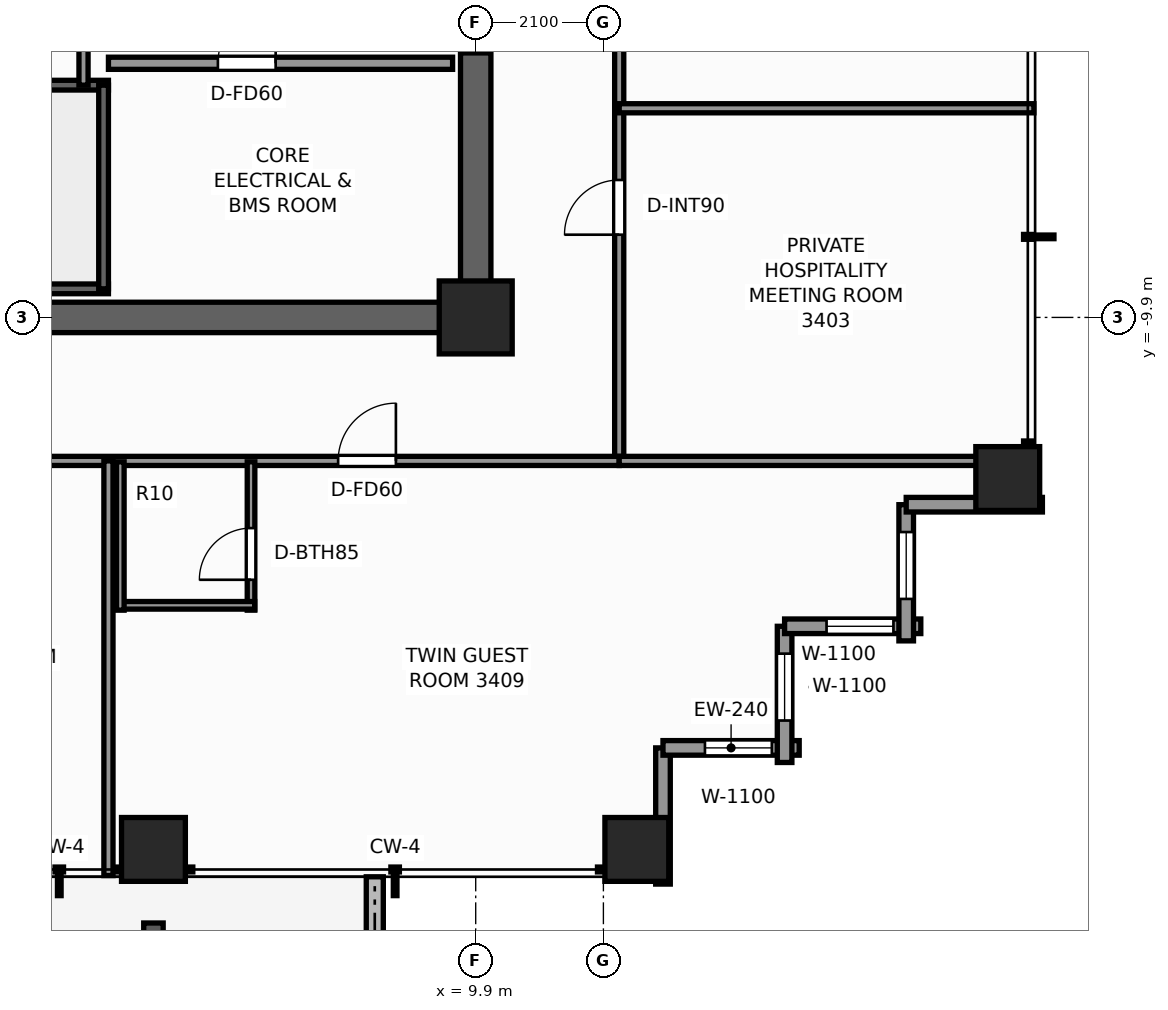
"""IFC4 building model, lengths in metres.
Left out: names, types, materials, properties, quantities, classifications, styles, units other than length and angle.
Written with IfcOpenShell. Run it as: python <this file> out.ifc"""

import sys

from ifc_helpers import new_model, si_unit, direction, frame, frame_2d, origin, origin_2d, place, context, subcontext, project, spatial, rectangle, extrude, element, fill, save


model = new_model("IFC4")
c1 = context("Model", 3, precision=1e-05, world=origin(), true_north=direction((0.0, 1.0)))
c2 = subcontext(c1, "Body", "Model", "MODEL_VIEW")
j1 = project(units=[si_unit("LENGTHUNIT", "METRE"), si_unit("PLANEANGLEUNIT", "RADIAN")], contexts=[c1])
p1 = place(None, origin())
s1 = spatial("IfcSite", under=j1, at=p1, CompositionType="ELEMENT")
p2 = place(p1, origin())
s2 = spatial("IfcBuilding", under=s1, at=p2, CompositionType="ELEMENT")
p3 = place(p2, frame((0.0, 0.0, 118.4)))
s3 = spatial("IfcBuildingStorey", under=s2, at=p3, CompositionType="ELEMENT", Elevation=118.4)
p4 = place(p3, frame((10.15, -9.9, 0.0), z_axis=(0.0, 0.0, 1.0), x_axis=(-1.0, 0.0, 0.0)))
e1 = element("IfcWall", 1, at=p4, inside=s3, PredefinedType="SHEAR", context=c2, shape_type="SweptSolid", body=[
    extrude(rectangle(XDim=12.01, YDim=0.5, at=frame_2d((6.005, 0.0))), origin(), (0.0, 0.0, 1.0), 3.3),
])
p5 = place(p3, frame((9.9, -9.65, 0.0), z_axis=(0.0, 0.0, 1.0), x_axis=(0.0, 1.0, 0.0)))
e2 = element("IfcWall", 2, at=p5, inside=s3, PredefinedType="SHEAR", context=c2, shape_type="SweptSolid", body=[
    extrude(rectangle(XDim=4.1, YDim=0.5, at=frame_2d((2.05, 0.0))), origin(), (0.0, 0.0, 1.0), 3.3),
])
p6 = place(p3, frame((9.9, -9.9, 0.0), z_axis=(0.0, 0.0, 1.0), x_axis=(1.0, 0.0, 0.0)))
e3 = element("IfcColumn", 3, at=p6, inside=s3, PredefinedType="COLUMN", context=c2, shape_type="SweptSolid", body=[
    extrude(rectangle(XDim=1.2, YDim=1.2, at=origin_2d()), origin(), (0.0, 0.0, 1.0), 3.3),
])
for number, where, z_axis, x_axis in (
    (4, (4.6, -18.65, 0.0), (0.0, 0.0, 1.0), (1.0, 0.0, 0.0)),
    (5, (12.55, -18.65, 0.0), (0.0, 0.0, 1.0), (1.0, 0.0, 0.0)),
    (6, (18.65, -12.55, 0.0), (0.0, 0.0, 1.0), (1.0, 0.0, 0.0)),
):
    element("IfcColumn", number, at=place(p3, frame(where, z_axis=z_axis, x_axis=x_axis)), inside=s3, PredefinedType="COLUMN", context=c2, shape_type="SweptSolid", body=[
        extrude(rectangle(XDim=1.05, YDim=1.05, at=origin_2d()), origin(), (0.0, 0.0, 1.0), 3.3),
    ])
p7 = place(p3, frame((8.24, -20.566, -0.04), z_axis=(0.0, 0.0, 1.0), x_axis=(0.0, 1.0, 0.0)))
e7 = element("IfcWall", 7, at=p7, inside=s3, PredefinedType="PARAPET", context=c2, shape_type="SweptSolid", body=[
    extrude(rectangle(XDim=1.466, YDim=0.28, at=frame_2d((0.733, 0.0))), origin(), (0.0, 0.0, 1.0), 0.42),
])
p8 = place(p3, frame((12.98, -16.98, 0.0), z_axis=(0.0, 0.0, 1.0), x_axis=(0.0, -1.0, 0.0)))
e8 = element("IfcWall", 8, at=p8, inside=s3, PredefinedType="STANDARD", context=c2, shape_type="SweptSolid", body=[
    extrude(rectangle(XDim=2.24, YDim=0.24, at=frame_2d((1.12, 0.0))), origin(), (0.0, 0.0, 1.0), 2.459),
])
p9 = place(p3, frame((15.22, -16.98, 0.0), z_axis=(0.0, 0.0, 1.0), x_axis=(-1.0, 0.0, 0.0)))
e9 = element("IfcWall", 9, at=p9, inside=s3, PredefinedType="STANDARD", context=c2, shape_type="SweptSolid", body=[
    extrude(rectangle(XDim=2.24, YDim=0.24, at=frame_2d((1.12, 0.0))), origin(), (0.0, 0.0, 1.0), 2.459),
])
p10 = place(p9, frame((0.45, 0.0, 0.65)))
e10 = element("IfcOpeningElement", 10, at=p10, cuts=e9, PredefinedType="OPENING", context=c2, shape_type="SweptSolid", body=[
    extrude(rectangle(XDim=1.1, YDim=1.45, at=frame_2d((0.55, 0.725))), frame((0.0, 0.13, 0.0), z_axis=(0.0, -1.0, 0.0), x_axis=(1.0, 0.0, 0.0)), (0.0, 0.0, 1.0), 0.26),
])
p11 = place(p3, frame((14.98, -14.98, 0.0), z_axis=(0.0, 0.0, 1.0), x_axis=(0.0, -1.0, 0.0)))
e11 = element("IfcWall", 11, at=p11, inside=s3, PredefinedType="STANDARD", context=c2, shape_type="SweptSolid", body=[
    extrude(rectangle(XDim=2.24, YDim=0.24, at=frame_2d((1.12, 0.0))), origin(), (0.0, 0.0, 1.0), 2.459),
])
p12 = place(p11, frame((0.45, 0.0, 0.65)))
e12 = element("IfcOpeningElement", 12, at=p12, cuts=e11, PredefinedType="OPENING", context=c2, shape_type="SweptSolid", body=[
    extrude(rectangle(XDim=1.1, YDim=1.45, at=frame_2d((0.55, 0.725))), frame((0.0, 0.13, 0.0), z_axis=(0.0, -1.0, 0.0), x_axis=(1.0, 0.0, 0.0)), (0.0, 0.0, 1.0), 0.26),
])
p13 = place(p3, frame((17.22, -14.98, 0.0), z_axis=(0.0, 0.0, 1.0), x_axis=(-1.0, 0.0, 0.0)))
e13 = element("IfcWall", 13, at=p13, inside=s3, PredefinedType="STANDARD", context=c2, shape_type="SweptSolid", body=[
    extrude(rectangle(XDim=2.24, YDim=0.24, at=frame_2d((1.12, 0.0))), origin(), (0.0, 0.0, 1.0), 2.459),
])
p14 = place(p13, frame((0.45, 0.0, 0.65)))
e14 = element("IfcOpeningElement", 14, at=p14, cuts=e13, PredefinedType="OPENING", context=c2, shape_type="SweptSolid", body=[
    extrude(rectangle(XDim=1.1, YDim=1.45, at=frame_2d((0.55, 0.725))), frame((0.0, 0.13, 0.0), z_axis=(0.0, -1.0, 0.0), x_axis=(1.0, 0.0, 0.0)), (0.0, 0.0, 1.0), 0.26),
])
p15 = place(p3, frame((16.98, -12.98, 0.0), z_axis=(0.0, 0.0, 1.0), x_axis=(0.0, -1.0, 0.0)))
e15 = element("IfcWall", 15, at=p15, inside=s3, PredefinedType="STANDARD", context=c2, shape_type="SweptSolid", body=[
    extrude(rectangle(XDim=2.24, YDim=0.24, at=frame_2d((1.12, 0.0))), origin(), (0.0, 0.0, 1.0), 2.459),
])
p16 = place(p15, frame((0.45, 0.0, 0.65)))
e16 = element("IfcOpeningElement", 16, at=p16, cuts=e15, PredefinedType="OPENING", context=c2, shape_type="SweptSolid", body=[
    extrude(rectangle(XDim=1.1, YDim=1.45, at=frame_2d((0.55, 0.725))), frame((0.0, 0.13, 0.0), z_axis=(0.0, -1.0, 0.0), x_axis=(1.0, 0.0, 0.0)), (0.0, 0.0, 1.0), 0.26),
])
p17 = place(p3, frame((19.22, -12.98, 0.0), z_axis=(0.0, 0.0, 1.0), x_axis=(-1.0, 0.0, 0.0)))
e17 = element("IfcWall", 17, at=p17, inside=s3, PredefinedType="STANDARD", context=c2, shape_type="SweptSolid", body=[
    extrude(rectangle(XDim=2.24, YDim=0.24, at=frame_2d((1.12, 0.0))), origin(), (0.0, 0.0, 1.0), 2.459),
])
p18 = place(p3, frame((3.86, -9.43, 0.0), z_axis=(0.0, 0.0, 1.0), x_axis=(-1.0, 0.0, 0.0)))
e18 = element("IfcWall", 18, at=p18, inside=s3, PredefinedType="SHEAR", context=c2, shape_type="SweptSolid", body=[
    extrude(rectangle(XDim=7.72, YDim=0.16, at=frame_2d((3.86, 0.0))), origin(), (0.0, 0.0, 1.0), 3.3),
])
p19 = place(p18, frame((6.01, 0.0, 0.0)))
e19 = element("IfcOpeningElement", 19, at=p19, cuts=e18, PredefinedType="OPENING", context=c2, shape_type="SweptSolid", body=[
    extrude(rectangle(XDim=1.1, YDim=2.2, at=frame_2d((0.55, 1.1))), frame((0.0, 0.09, 0.0), z_axis=(0.0, -1.0, 0.0), x_axis=(1.0, 0.0, 0.0)), (0.0, 0.0, 1.0), 0.18),
])
p20 = place(p3, frame((-3.86, -6.08, 0.0), z_axis=(0.0, 0.0, 1.0), x_axis=(1.0, 0.0, 0.0)))
e20 = element("IfcWall", 20, at=p20, inside=s3, PredefinedType="SHEAR", context=c2, shape_type="SweptSolid", body=[
    extrude(rectangle(XDim=7.72, YDim=0.16, at=frame_2d((3.86, 0.0))), origin(), (0.0, 0.0, 1.0), 3.3),
])
p21 = place(p3, frame((3.78, -9.43, 0.0), z_axis=(0.0, 0.0, 1.0), x_axis=(0.0, 1.0, 0.0)))
e21 = element("IfcWall", 21, at=p21, inside=s3, PredefinedType="SHEAR", context=c2, shape_type="SweptSolid", body=[
    extrude(rectangle(XDim=3.35, YDim=0.16, at=frame_2d((1.675, 0.0))), origin(), (0.0, 0.0, 1.0), 3.3),
])
p22 = place(p3, frame((3.86, -5.72, 0.0), z_axis=(0.0, 0.0, 1.0), x_axis=(1.0, 0.0, 0.0)))
e22 = element("IfcWall", 22, at=p22, inside=s3, PredefinedType="SOLIDWALL", context=c2, shape_type="SweptSolid", body=[
    extrude(rectangle(XDim=5.66, YDim=0.2, at=frame_2d((2.83, 0.0))), origin(), (0.0, 0.0, 1.0), 3.08),
])
p23 = place(p22, frame((1.8, 0.0, 0.0)))
e23 = element("IfcOpeningElement", 23, at=p23, cuts=e22, PredefinedType="OPENING", context=c2, shape_type="SweptSolid", body=[
    extrude(rectangle(XDim=0.95, YDim=2.06, at=frame_2d((0.475, 1.03))), frame((0.0, 0.11, 0.0), z_axis=(0.0, -1.0, 0.0), x_axis=(1.0, 0.0, 0.0)), (0.0, 0.0, 1.0), 0.22),
])
p24 = place(p3, frame((3.45, -6.08, 0.0), z_axis=(0.0, 0.0, 1.0), x_axis=(0.0, 1.0, 0.0)))
e24 = element("IfcWall", 24, at=p24, inside=s3, PredefinedType="PARTITIONING", context=c2, shape_type="SweptSolid", body=[
    extrude(rectangle(XDim=2.36, YDim=0.15, at=frame_2d((1.18, 0.0))), origin(), (0.0, 0.0, 1.0), 3.08),
])
p25 = place(p24, frame((0.65, 0.0, 0.0)))
e25 = element("IfcOpeningElement", 25, at=p25, cuts=e24, PredefinedType="OPENING", context=c2, shape_type="SweptSolid", body=[
    extrude(rectangle(XDim=0.95, YDim=2.06, at=frame_2d((0.475, 1.03))), frame((0.0, 0.085, 0.0), z_axis=(0.0, -1.0, 0.0), x_axis=(1.0, 0.0, 0.0)), (0.0, 0.0, 1.0), 0.17),
])
p26 = place(p3, frame((12.26, -12.26, 0.0), z_axis=(0.0, 0.0, 1.0), x_axis=(0.0, 1.0, 0.0)))
e26 = element("IfcWall", 26, at=p26, inside=s3, PredefinedType="PARTITIONING", context=c2, shape_type="SweptSolid", body=[
    extrude(rectangle(XDim=24.84, YDim=0.15, at=frame_2d((12.42, 0.0))), origin(), (0.0, 0.0, 1.0), 2.292),
])
p27 = place(p26, frame((3.721, 0.0, 0.0)))
e27 = element("IfcOpeningElement", 27, at=p27, cuts=e26, PredefinedType="OPENING", context=c2, shape_type="SweptSolid", body=[
    extrude(rectangle(XDim=0.9, YDim=2.06, at=frame_2d((0.45, 1.03))), frame((0.0, 0.085, 0.0), z_axis=(0.0, -1.0, 0.0), x_axis=(1.0, 0.0, 0.0)), (0.0, 0.0, 1.0), 0.17),
])
p28 = place(p26, frame((9.78, 0.0, 0.0)))
e28 = element("IfcOpeningElement", 28, at=p28, cuts=e26, PredefinedType="OPENING", context=c2, shape_type="SweptSolid", body=[
    extrude(rectangle(XDim=0.9, YDim=2.06, at=frame_2d((0.45, 1.03))), frame((0.0, 0.085, 0.0), z_axis=(0.0, -1.0, 0.0), x_axis=(1.0, 0.0, 0.0)), (0.0, 0.0, 1.0), 0.17),
])
p29 = place(p26, frame((20.209, 0.0, 0.0)))
e29 = element("IfcOpeningElement", 29, at=p29, cuts=e26, PredefinedType="OPENING", context=c2, shape_type="SweptSolid", body=[
    extrude(rectangle(XDim=0.95, YDim=2.06, at=frame_2d((0.475, 1.03))), frame((0.0, 0.085, 0.0), z_axis=(0.0, -1.0, 0.0), x_axis=(1.0, 0.0, 0.0)), (0.0, 0.0, 1.0), 0.17),
])
p30 = place(p3, frame((-3.65, -12.26, 0.0), z_axis=(0.0, 0.0, 1.0), x_axis=(1.0, 0.0, 0.0)))
e30 = element("IfcWall", 30, at=p30, inside=s3, PredefinedType="PARTITIONING", context=c2, shape_type="SweptSolid", body=[
    extrude(rectangle(XDim=15.91, YDim=0.15, at=frame_2d((7.955, 0.0))), origin(), (0.0, 0.0, 1.0), 2.292),
])
p31 = place(p30, frame((0.992, 0.0, 0.0)))
e31 = element("IfcOpeningElement", 31, at=p31, cuts=e30, PredefinedType="OPENING", context=c2, shape_type="SweptSolid", body=[
    extrude(rectangle(XDim=0.9, YDim=2.06, at=frame_2d((0.45, 1.03))), frame((0.0, 0.085, 0.0), z_axis=(0.0, -1.0, 0.0), x_axis=(1.0, 0.0, 0.0)), (0.0, 0.0, 1.0), 0.17),
])
p32 = place(p30, frame((5.019, 0.0, 0.0)))
e32 = element("IfcOpeningElement", 32, at=p32, cuts=e30, PredefinedType="OPENING", context=c2, shape_type="SweptSolid", body=[
    extrude(rectangle(XDim=0.95, YDim=2.06, at=frame_2d((0.475, 1.03))), frame((0.0, 0.085, 0.0), z_axis=(0.0, -1.0, 0.0), x_axis=(1.0, 0.0, 0.0)), (0.0, 0.0, 1.0), 0.17),
])
p33 = place(p30, frame((11.288, 0.0, 0.0)))
e33 = element("IfcOpeningElement", 33, at=p33, cuts=e30, PredefinedType="OPENING", context=c2, shape_type="SweptSolid", body=[
    extrude(rectangle(XDim=0.95, YDim=2.06, at=frame_2d((0.475, 1.03))), frame((0.0, 0.085, 0.0), z_axis=(0.0, -1.0, 0.0), x_axis=(1.0, 0.0, 0.0)), (0.0, 0.0, 1.0), 0.17),
])
p34 = place(p3, frame((12.26, -12.26, 0.0), z_axis=(0.0, 0.0, 1.0), x_axis=(1.0, 0.0, 0.0)))
e34 = element("IfcWall", 34, at=p34, inside=s3, PredefinedType="PARTITIONING", context=c2, shape_type="SweptSolid", body=[
    extrude(rectangle(XDim=6.82, YDim=0.15, at=frame_2d((3.41, 0.0))), origin(), (0.0, 0.0, 1.0), 2.292),
])
for number, where, z_axis, x_axis in (
    (35, (12.26, -6.46, 0.0), (0.0, 0.0, 1.0), (1.0, 0.0, 0.0)),
    (36, (3.86, -19.08, 0.0), (0.0, 0.0, 1.0), (0.0, 1.0, 0.0)),
):
    element("IfcWall", number, at=place(p3, frame(where, z_axis=z_axis, x_axis=x_axis)), inside=s3, PredefinedType="PARTITIONING", context=c2, shape_type="SweptSolid", body=[
        extrude(rectangle(XDim=6.82, YDim=0.15, at=frame_2d((3.41, 0.0))), origin(), (0.0, 0.0, 1.0), 2.449),
    ])
p35 = place(p3, frame((6.205, -14.715, 0.0), z_axis=(0.0, 0.0, 1.0), x_axis=(0.0, 1.0, 0.0)))
e37 = element("IfcWall", 37, at=p35, inside=s3, PredefinedType="PARTITIONING", context=c2, shape_type="SweptSolid", body=[
    extrude(rectangle(XDim=2.44, YDim=0.125, at=frame_2d((1.22, 0.0))), origin(), (0.0, 0.0, 1.0), 3.08),
])
p36 = place(p35, frame((0.5, 0.0, 0.0)))
e38 = element("IfcOpeningElement", 38, at=p36, cuts=e37, PredefinedType="OPENING", context=c2, shape_type="SweptSolid", body=[
    extrude(rectangle(XDim=0.85, YDim=2.03, at=frame_2d((0.425, 1.015))), frame((0.0, 0.073, 0.0), z_axis=(0.0, -1.0, 0.0), x_axis=(1.0, 0.0, 0.0)), (0.0, 0.0, 1.0), 0.145),
])
p37 = place(p3, frame((3.995, -14.635, 0.0), z_axis=(0.0, 0.0, 1.0), x_axis=(1.0, 0.0, 0.0)))
e39 = element("IfcWall", 39, at=p37, inside=s3, PredefinedType="PARTITIONING", context=c2, shape_type="SweptSolid", body=[
    extrude(rectangle(XDim=2.27, YDim=0.125, at=frame_2d((1.135, 0.0))), origin(), (0.0, 0.0, 1.0), 2.292),
])
p38 = place(p3, frame((4.055, -14.715, 0.0), z_axis=(0.0, 0.0, 1.0), x_axis=(0.0, 1.0, 0.0)))
e40 = element("IfcWall", 40, at=p38, inside=s3, PredefinedType="PARTITIONING", context=c2, shape_type="SweptSolid", body=[
    extrude(rectangle(XDim=2.44, YDim=0.125, at=frame_2d((1.22, 0.0))), origin(), (0.0, 0.0, 1.0), 3.08),
])
p39 = place(p10, origin())
e41 = element("IfcWindow", 41, at=p39, inside=s3, PartitioningType="SINGLE_PANEL", PredefinedType="WINDOW", context=c2, shape_type="SweptSolid", body=[
    extrude(rectangle(XDim=1.1, YDim=1.45, at=frame_2d((0.55, 0.725))), frame((0.0, 0.03, 0.0), z_axis=(0.0, -1.0, 0.0), x_axis=(1.0, 0.0, 0.0)), (0.0, 0.0, 1.0), 0.06),
])
fill(e10, e41)
p40 = place(p12, origin())
e42 = element("IfcWindow", 42, at=p40, inside=s3, PartitioningType="SINGLE_PANEL", PredefinedType="WINDOW", context=c2, shape_type="SweptSolid", body=[
    extrude(rectangle(XDim=1.1, YDim=1.45, at=frame_2d((0.55, 0.725))), frame((0.0, 0.03, 0.0), z_axis=(0.0, -1.0, 0.0), x_axis=(1.0, 0.0, 0.0)), (0.0, 0.0, 1.0), 0.06),
])
fill(e12, e42)
p41 = place(p14, origin())
e43 = element("IfcWindow", 43, at=p41, inside=s3, PartitioningType="SINGLE_PANEL", PredefinedType="WINDOW", context=c2, shape_type="SweptSolid", body=[
    extrude(rectangle(XDim=1.1, YDim=1.45, at=frame_2d((0.55, 0.725))), frame((0.0, 0.03, 0.0), z_axis=(0.0, -1.0, 0.0), x_axis=(1.0, 0.0, 0.0)), (0.0, 0.0, 1.0), 0.06),
])
fill(e14, e43)
p42 = place(p16, origin())
e44 = element("IfcWindow", 44, at=p42, inside=s3, PartitioningType="SINGLE_PANEL", PredefinedType="WINDOW", context=c2, shape_type="SweptSolid", body=[
    extrude(rectangle(XDim=1.1, YDim=1.45, at=frame_2d((0.55, 0.725))), frame((0.0, 0.03, 0.0), z_axis=(0.0, -1.0, 0.0), x_axis=(1.0, 0.0, 0.0)), (0.0, 0.0, 1.0), 0.06),
])
fill(e16, e44)
p43 = place(p23, origin())
e45 = element("IfcDoor", 45, at=p43, inside=s3, OperationType="SINGLE_SWING_RIGHT", PredefinedType="DOOR", context=c2, shape_type="SweptSolid", body=[
    extrude(rectangle(XDim=0.95, YDim=2.06, at=frame_2d((0.475, 1.03))), frame((0.0, 0.025, 0.0), z_axis=(0.0, -1.0, 0.0), x_axis=(1.0, 0.0, 0.0)), (0.0, 0.0, 1.0), 0.05),
])
fill(e23, e45)
p44 = place(p27, origin())
e46 = element("IfcDoor", 46, at=p44, inside=s3, OperationType="SINGLE_SWING_LEFT", PredefinedType="DOOR", context=c2, shape_type="SweptSolid", body=[
    extrude(rectangle(XDim=0.9, YDim=2.06, at=frame_2d((0.45, 1.03))), frame((0.0, 0.025, 0.0), z_axis=(0.0, -1.0, 0.0), x_axis=(1.0, 0.0, 0.0)), (0.0, 0.0, 1.0), 0.05),
])
fill(e27, e46)
p45 = place(p36, origin())
e47 = element("IfcDoor", 47, at=p45, inside=s3, OperationType="SINGLE_SWING_LEFT", PredefinedType="DOOR", context=c2, shape_type="SweptSolid", body=[
    extrude(rectangle(XDim=0.85, YDim=2.03, at=frame_2d((0.425, 1.015))), frame((0.0, 0.025, 0.0), z_axis=(0.0, -1.0, 0.0), x_axis=(1.0, 0.0, 0.0)), (0.0, 0.0, 1.0), 0.05),
])
fill(e38, e47)
p46 = place(p33, origin())
e48 = element("IfcDoor", 48, at=p46, inside=s3, OperationType="SINGLE_SWING_RIGHT", PredefinedType="DOOR", context=c2, shape_type="SweptSolid", body=[
    extrude(rectangle(XDim=0.95, YDim=2.06, at=frame_2d((0.475, 1.03))), frame((0.0, 0.025, 0.0), z_axis=(0.0, -1.0, 0.0), x_axis=(1.0, 0.0, 0.0)), (0.0, 0.0, 1.0), 0.05),
])
fill(e33, e48)
save(model, sys.argv[1])
